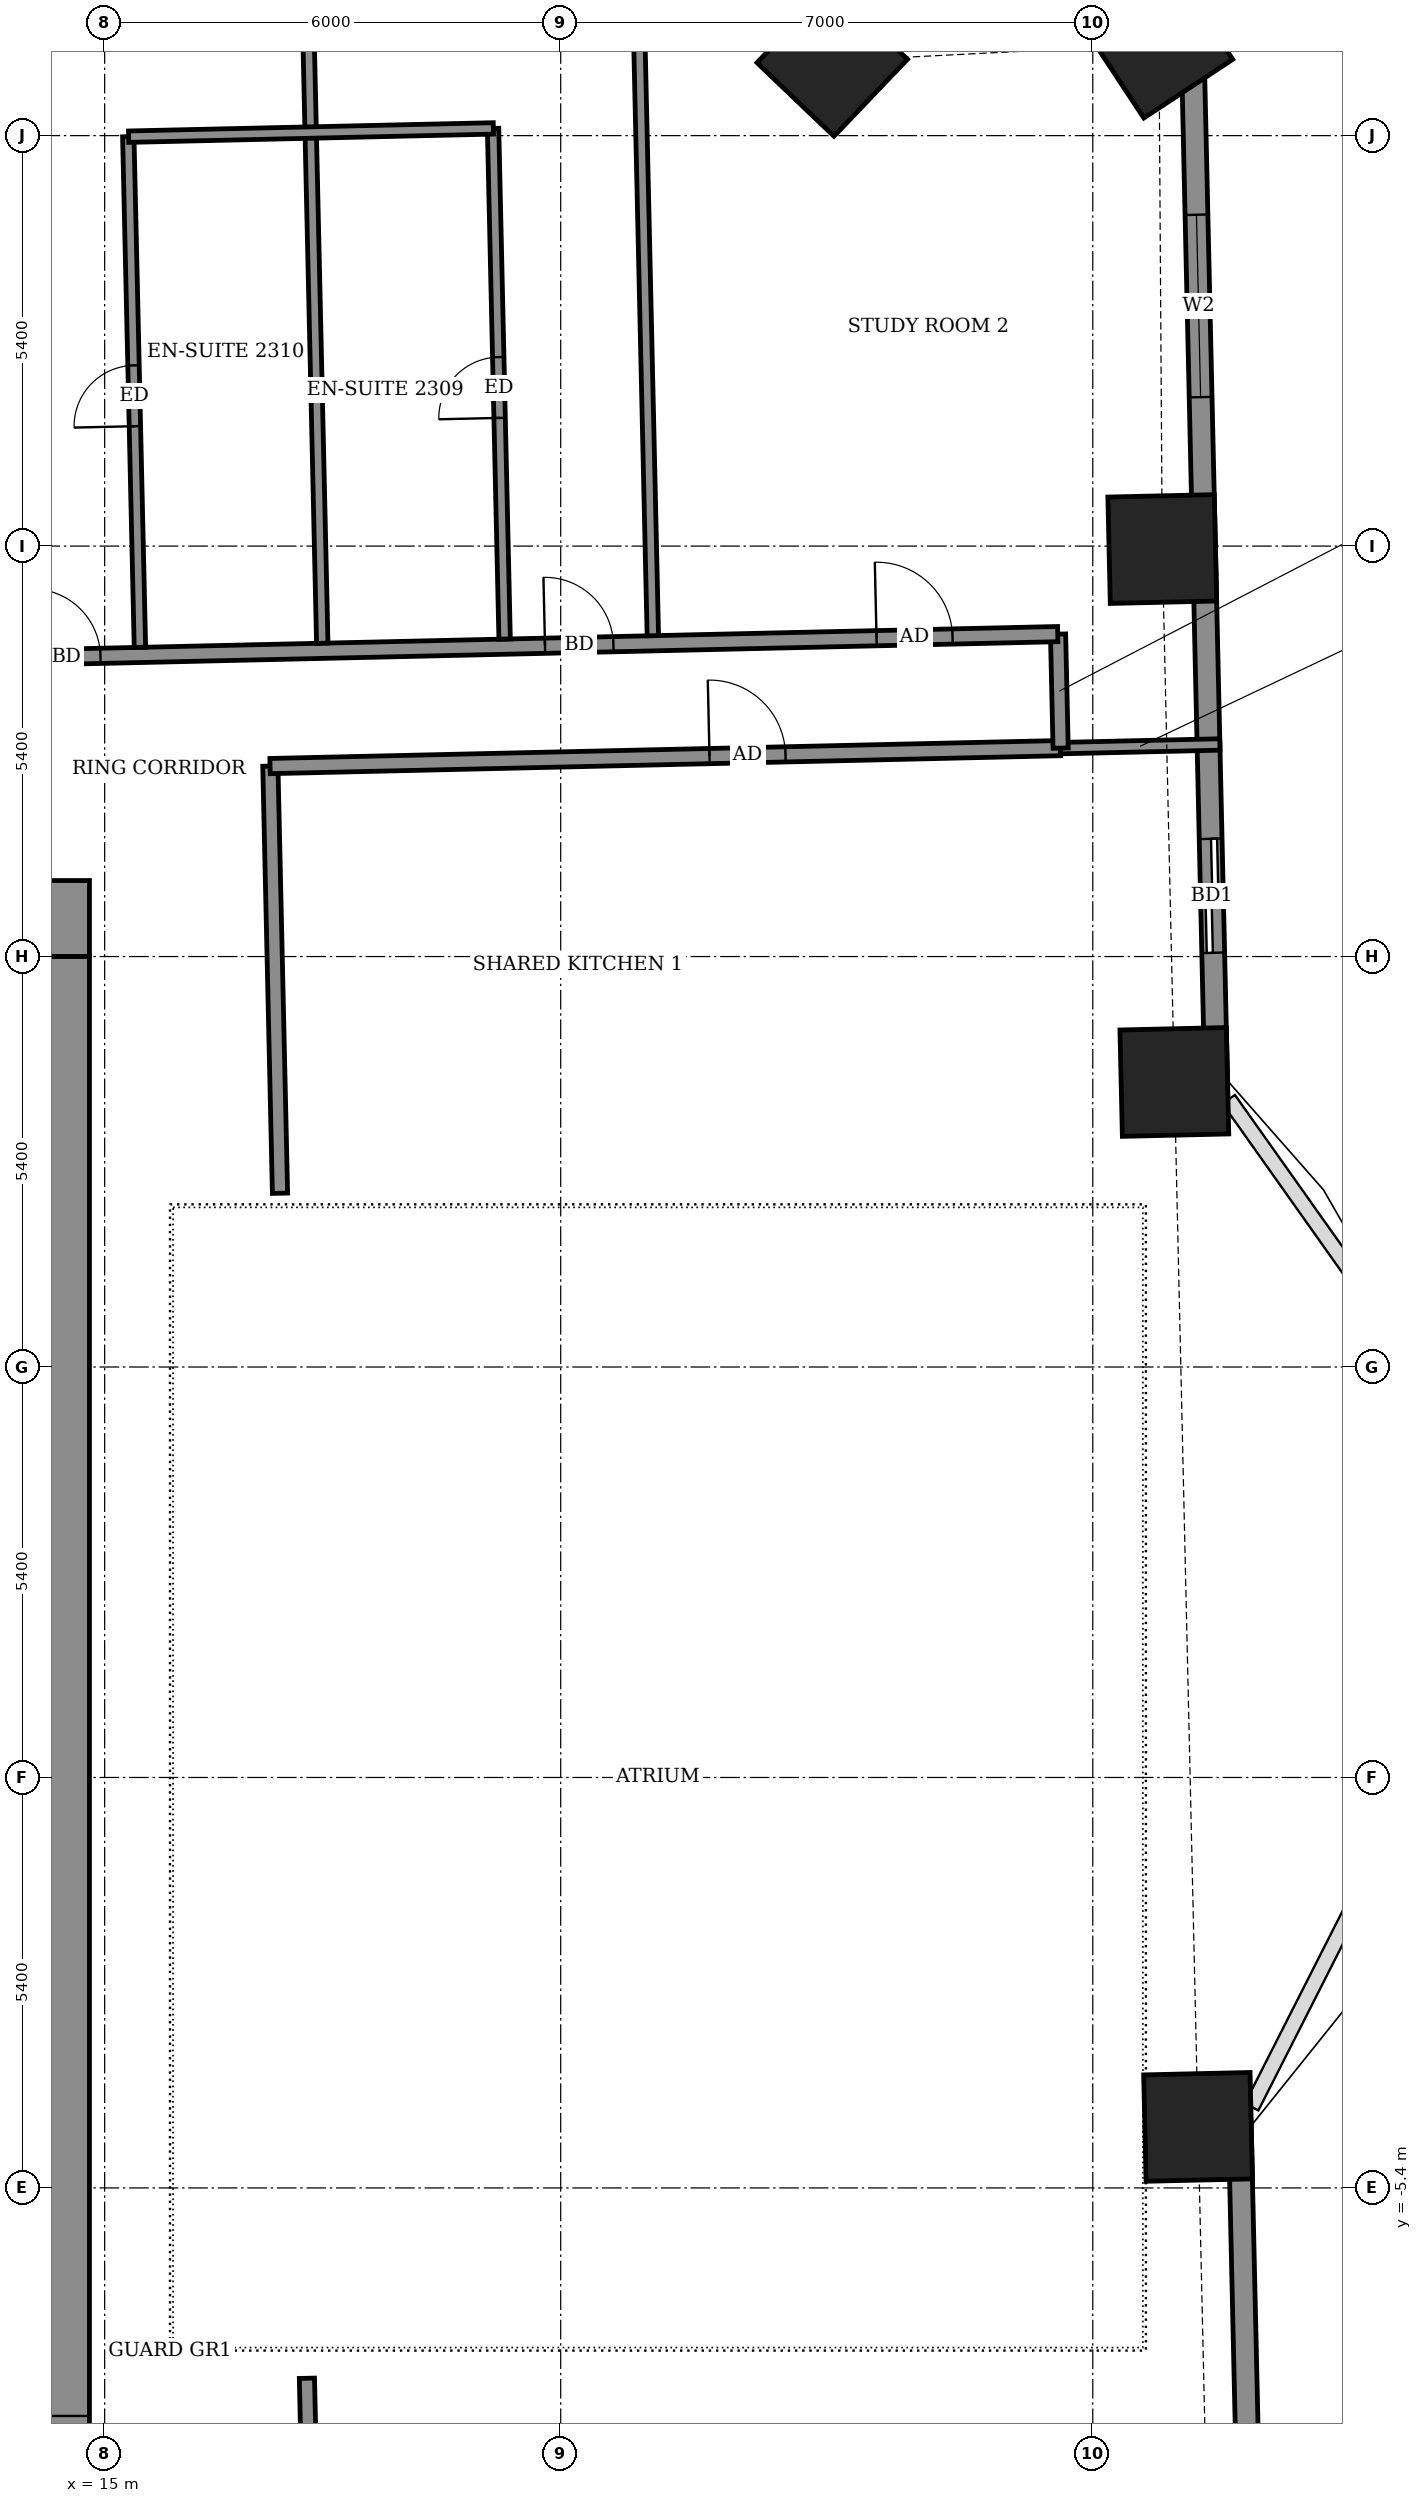
"""IFC4 building model, lengths in metres.
Left out: names, types, materials, properties, quantities, classifications, styles, units other than length and angle.
Written with IfcOpenShell. Run it as: python <this file> out.ifc"""

import sys

from ifc_helpers import new_model, si_unit, direction, frame, frame_2d, origin, origin_2d, place, context, subcontext, project, spatial, rectangle, extrude, element, fill, save


model = new_model("IFC4")
c1 = context("Model", 3, precision=1e-05, world=origin(), true_north=direction((0.0, 1.0)))
c2 = subcontext(c1, "Body", "Model", "MODEL_VIEW")
j1 = project(units=[si_unit("LENGTHUNIT", "METRE"), si_unit("PLANEANGLEUNIT", "RADIAN")], contexts=[c1])
p1 = place(None, origin())
s1 = spatial("IfcSite", under=j1, at=p1, CompositionType="ELEMENT")
p2 = place(p1, origin())
s2 = spatial("IfcBuilding", under=s1, at=p2, CompositionType="ELEMENT")
p3 = place(p2, frame((0.0, 0.0, 93.7)))
s3 = spatial("IfcBuildingStorey", under=s2, at=p3, CompositionType="ELEMENT", Elevation=93.7)
for number, where, z_axis, x_axis in (
    (1, (29.385, -4.597, -0.55), (0.0, 0.0, 1.0), (-0.023, 1.0, 0.0)),
    (2, (29.073, 9.15, -0.55), (0.0, 0.0, 1.0), (-0.023, 1.0, 0.0)),
    (3, (28.914, 16.161, -0.55), (0.0, 0.0, 1.0), (-0.023, 1.0, 0.0)),
    (4, (28.871, 22.802, -0.55), (0.0, 0.0, 1.0), (-0.551, 0.835, 0.0)),
    (5, (24.572, 22.582, -0.55), (0.0, 0.0, 1.0), (-0.723, 0.691, 0.0)),
):
    element("IfcColumn", number, at=place(p3, frame(where, z_axis=z_axis, x_axis=x_axis)), inside=s3, PredefinedType="COLUMN", context=c2, shape_type="SweptSolid", body=[
        extrude(rectangle(XDim=1.4, YDim=1.4, at=origin_2d()), origin(), (0.0, 0.0, 1.0), 3.6),
    ])
p4 = place(p3, frame((30.227, -17.455, 0.0), z_axis=(0.0, 0.0, 1.0), x_axis=(-0.022734702163, 0.999741533256, 0.0)))
e6 = element("IfcWall", 6, at=p4, inside=s3, PredefinedType="SOLIDWALL", context=c2, shape_type="SweptSolid", body=[
    extrude(rectangle(XDim=12.929, YDim=0.3, at=frame_2d((6.465, 0.0))), origin(), (0.0, 0.0, 1.0), 3.05),
])
p5 = place(p4, frame((2.566, 0.0, 0.0)))
e7 = element("IfcOpeningElement", 7, at=p5, cuts=e6, PredefinedType="OPENING", context=c2, shape_type="SweptSolid", body=[
    extrude(rectangle(XDim=1.5, YDim=2.4, at=frame_2d((0.75, 1.2))), frame((0.0, 0.16, 0.0), z_axis=(0.0, -1.0, 0.0), x_axis=(1.0, 0.0, 0.0)), (0.0, 0.0, 1.0), 0.32),
])
p6 = place(p4, frame((7.646, 0.0, 0.9)))
e8 = element("IfcOpeningElement", 8, at=p6, cuts=e6, PredefinedType="OPENING", context=c2, shape_type="SweptSolid", body=[
    extrude(rectangle(XDim=1.2, YDim=1.5, at=frame_2d((0.6, 0.75))), frame((0.0, 0.16, 0.0), z_axis=(0.0, -1.0, 0.0), x_axis=(1.0, 0.0, 0.0)), (0.0, 0.0, 1.0), 0.32),
])
p7 = place(p3, frame((29.624, 9.108, 0.0), z_axis=(0.0, 0.0, 1.0), x_axis=(-0.022679601751, 0.999742784752, 0.0)))
e9 = element("IfcWall", 9, at=p7, inside=s3, PredefinedType="SOLIDWALL", context=c2, shape_type="SweptSolid", body=[
    extrude(rectangle(XDim=13.93, YDim=0.3, at=frame_2d((6.965, 0.0))), origin(), (0.0, 0.0, 1.0), 3.05),
])
p8 = place(p7, frame((1.742, 0.0, 0.0)))
e10 = element("IfcOpeningElement", 10, at=p8, cuts=e9, PredefinedType="OPENING", context=c2, shape_type="SweptSolid", body=[
    extrude(rectangle(XDim=1.5, YDim=2.4, at=frame_2d((0.75, 1.2))), frame((0.0, 0.16, 0.0), z_axis=(0.0, -1.0, 0.0), x_axis=(1.0, 0.0, 0.0)), (0.0, 0.0, 1.0), 0.32),
])
p9 = place(p7, frame((9.054, 0.0, 0.9)))
e11 = element("IfcOpeningElement", 11, at=p9, cuts=e9, PredefinedType="OPENING", context=c2, shape_type="SweptSolid", body=[
    extrude(rectangle(XDim=2.4, YDim=1.5, at=frame_2d((1.2, 0.75))), frame((0.0, 0.16, 0.0), z_axis=(0.0, -1.0, 0.0), x_axis=(1.0, 0.0, 0.0)), (0.0, 0.0, 1.0), 0.32),
])
p10 = place(p3, frame((17.757, -12.137, 0.0), z_axis=(0.0, 0.0, 1.0), x_axis=(-0.022718785711, 0.999741895079, 0.0)))
e12 = element("IfcWall", 12, at=p10, inside=s3, PredefinedType="PARTITIONING", context=c2, shape_type="SweptSolid", body=[
    extrude(rectangle(XDim=4.234, YDim=0.2, at=frame_2d((2.117, 0.0))), origin(), (0.0, 0.0, 1.0), 3.05),
])
p11 = place(p3, frame((17.307, 7.686, 0.0), z_axis=(0.0, 0.0, 1.0), x_axis=(-0.022584272568, 0.999744942789, 0.0)))
e13 = element("IfcWall", 13, at=p11, inside=s3, PredefinedType="PARTITIONING", context=c2, shape_type="SweptSolid", body=[
    extrude(rectangle(XDim=5.621, YDim=0.2, at=frame_2d((2.811, 0.0))), origin(), (0.0, 0.0, 1.0), 3.05),
])
p12 = place(p3, frame((17.176, 13.306, 0.0), z_axis=(0.0, 0.0, 1.0), x_axis=(0.999742295888, 0.022701141223, 0.0)))
e14 = element("IfcWall", 14, at=p12, inside=s3, PredefinedType="PARTITIONING", context=c2, shape_type="SweptSolid", body=[
    extrude(rectangle(XDim=10.4, YDim=0.2, at=frame_2d((5.2, 0.0))), origin(), (0.0, 0.0, 1.0), 3.05),
])
p13 = place(p12, frame((5.783, 0.0, 0.0)))
e15 = element("IfcOpeningElement", 15, at=p13, cuts=e14, PredefinedType="OPENING", context=c2, shape_type="SweptSolid", body=[
    extrude(rectangle(XDim=1.0, YDim=2.1, at=frame_2d((0.5, 1.05))), frame((0.0, 0.11, 0.0), z_axis=(0.0, -1.0, 0.0), x_axis=(1.0, 0.0, 0.0)), (0.0, 0.0, 1.0), 0.22),
])
p14 = place(p3, frame((27.573, 13.542, 0.0), z_axis=(0.0, 0.0, 1.0), x_axis=(0.999737616439, 0.022906293375, 0.0)))
e16 = element("IfcWall", 16, at=p14, inside=s3, PredefinedType="PARTITIONING", context=c2, shape_type="SweptSolid", body=[
    extrude(rectangle(XDim=2.1, YDim=0.15, at=frame_2d((1.05, 0.0))), origin(), (0.0, 0.0, 1.0), 2.55),
])
p15 = place(p3, frame((27.577, 13.542, 0.0), z_axis=(0.0, 0.0, 1.0), x_axis=(-0.022617910375, 0.999744182344, 0.0)))
e17 = element("IfcWall", 17, at=p15, inside=s3, PredefinedType="PARTITIONING", context=c2, shape_type="SweptSolid", body=[
    extrude(rectangle(XDim=1.5, YDim=0.2, at=frame_2d((0.75, 0.0))), origin(), (0.0, 0.0, 1.0), 3.05),
])
p16 = place(p3, frame((-24.92, 13.851, 0.0), z_axis=(0.0, 0.0, 1.0), x_axis=(0.999742411711, 0.022696039895, 0.0)))
e18 = element("IfcWall", 18, at=p16, inside=s3, PredefinedType="PARTITIONING", context=c2, shape_type="SweptSolid", body=[
    extrude(rectangle(XDim=52.472, YDim=0.2, at=frame_2d((26.236, 0.0))), origin(), (0.0, 0.0, 1.0), 3.05),
])
p17 = place(p16, frame((50.088, 0.0, 0.0)))
e19 = element("IfcOpeningElement", 19, at=p17, cuts=e18, PredefinedType="OPENING", context=c2, shape_type="SweptSolid", body=[
    extrude(rectangle(XDim=1.0, YDim=2.1, at=frame_2d((0.5, 1.05))), frame((0.0, 0.11, 0.0), z_axis=(0.0, -1.0, 0.0), x_axis=(1.0, 0.0, 0.0)), (0.0, 0.0, 1.0), 0.22),
])
p18 = place(p16, frame((45.725, 0.0, 0.0)))
e20 = element("IfcOpeningElement", 20, at=p18, cuts=e18, PredefinedType="OPENING", context=c2, shape_type="SweptSolid", body=[
    extrude(rectangle(XDim=0.9, YDim=2.1, at=frame_2d((0.45, 1.05))), frame((0.0, 0.11, 0.0), z_axis=(0.0, -1.0, 0.0), x_axis=(1.0, 0.0, 0.0)), (0.0, 0.0, 1.0), 0.22),
])
p19 = place(p16, frame((38.975, 0.0, 0.0)))
e21 = element("IfcOpeningElement", 21, at=p19, cuts=e18, PredefinedType="OPENING", context=c2, shape_type="SweptSolid", body=[
    extrude(rectangle(XDim=0.9, YDim=2.1, at=frame_2d((0.45, 1.05))), frame((0.0, 0.11, 0.0), z_axis=(0.0, -1.0, 0.0), x_axis=(1.0, 0.0, 0.0)), (0.0, 0.0, 1.0), 0.22),
])
p20 = place(p16, frame((37.05, 0.0, 0.0)))
e22 = element("IfcOpeningElement", 22, at=p20, cuts=e18, PredefinedType="OPENING", context=c2, shape_type="SweptSolid", body=[
    extrude(rectangle(XDim=0.9, YDim=2.1, at=frame_2d((0.45, 1.05))), frame((0.0, 0.11, 0.0), z_axis=(0.0, -1.0, 0.0), x_axis=(1.0, 0.0, 0.0)), (0.0, 0.0, 1.0), 0.22),
])
p21 = place(p16, frame((30.35, 0.0, 0.0)))
e23 = element("IfcOpeningElement", 23, at=p21, cuts=e18, PredefinedType="OPENING", context=c2, shape_type="SweptSolid", body=[
    extrude(rectangle(XDim=0.9, YDim=2.1, at=frame_2d((0.45, 1.05))), frame((0.0, 0.11, 0.0), z_axis=(0.0, -1.0, 0.0), x_axis=(1.0, 0.0, 0.0)), (0.0, 0.0, 1.0), 0.22),
])
p22 = place(p16, frame((28.4, 0.0, 0.0)))
e24 = element("IfcOpeningElement", 24, at=p22, cuts=e18, PredefinedType="OPENING", context=c2, shape_type="SweptSolid", body=[
    extrude(rectangle(XDim=0.9, YDim=2.1, at=frame_2d((0.45, 1.05))), frame((0.0, 0.11, 0.0), z_axis=(0.0, -1.0, 0.0), x_axis=(1.0, 0.0, 0.0)), (0.0, 0.0, 1.0), 0.22),
])
p23 = place(p16, frame((21.675, 0.0, 0.0)))
e25 = element("IfcOpeningElement", 25, at=p23, cuts=e18, PredefinedType="OPENING", context=c2, shape_type="SweptSolid", body=[
    extrude(rectangle(XDim=0.9, YDim=2.1, at=frame_2d((0.45, 1.05))), frame((0.0, 0.11, 0.0), z_axis=(0.0, -1.0, 0.0), x_axis=(1.0, 0.0, 0.0)), (0.0, 0.0, 1.0), 0.22),
])
p24 = place(p16, frame((19.775, 0.0, 0.0)))
e26 = element("IfcOpeningElement", 26, at=p24, cuts=e18, PredefinedType="OPENING", context=c2, shape_type="SweptSolid", body=[
    extrude(rectangle(XDim=0.9, YDim=2.1, at=frame_2d((0.45, 1.05))), frame((0.0, 0.11, 0.0), z_axis=(0.0, -1.0, 0.0), x_axis=(1.0, 0.0, 0.0)), (0.0, 0.0, 1.0), 0.22),
])
p25 = place(p16, frame((13.0, 0.0, 0.0)))
e27 = element("IfcOpeningElement", 27, at=p25, cuts=e18, PredefinedType="OPENING", context=c2, shape_type="SweptSolid", body=[
    extrude(rectangle(XDim=0.9, YDim=2.1, at=frame_2d((0.45, 1.05))), frame((0.0, 0.11, 0.0), z_axis=(0.0, -1.0, 0.0), x_axis=(1.0, 0.0, 0.0)), (0.0, 0.0, 1.0), 0.22),
])
p26 = place(p16, frame((11.075, 0.0, 0.0)))
e28 = element("IfcOpeningElement", 28, at=p26, cuts=e18, PredefinedType="OPENING", context=c2, shape_type="SweptSolid", body=[
    extrude(rectangle(XDim=0.9, YDim=2.1, at=frame_2d((0.45, 1.05))), frame((0.0, 0.11, 0.0), z_axis=(0.0, -1.0, 0.0), x_axis=(1.0, 0.0, 0.0)), (0.0, 0.0, 1.0), 0.22),
])
p27 = place(p16, frame((3.049, 0.0, 0.0)))
e29 = element("IfcOpeningElement", 29, at=p27, cuts=e18, PredefinedType="OPENING", context=c2, shape_type="SweptSolid", body=[
    extrude(rectangle(XDim=1.0, YDim=2.1, at=frame_2d((0.5, 1.05))), frame((0.0, 0.11, 0.0), z_axis=(0.0, -1.0, 0.0), x_axis=(1.0, 0.0, 0.0)), (0.0, 0.0, 1.0), 0.22),
])
p28 = place(p3, frame((15.464, 14.868, 0.0), z_axis=(0.0, 0.0, 1.0), x_axis=(-0.022780001265, 0.999740502102, 0.0)))
e30 = element("IfcWall", 30, at=p28, inside=s3, PredefinedType="PARTITIONING", context=c2, shape_type="SweptSolid", body=[
    extrude(rectangle(XDim=6.72, YDim=0.15, at=frame_2d((3.36, 0.0))), origin(), (0.0, 0.0, 1.0), 3.05),
])
p29 = place(p28, frame((2.91, 0.0, 0.0)))
e31 = element("IfcOpeningElement", 31, at=p29, cuts=e30, PredefinedType="OPENING", context=c2, shape_type="SweptSolid", body=[
    extrude(rectangle(XDim=0.8, YDim=2.1, at=frame_2d((0.4, 1.05))), frame((0.0, 0.085, 0.0), z_axis=(0.0, -1.0, 0.0), x_axis=(1.0, 0.0, 0.0)), (0.0, 0.0, 1.0), 0.17),
])
p30 = place(p3, frame((17.863, 14.922, 0.0), z_axis=(0.0, 0.0, 1.0), x_axis=(-0.022661475803, 0.999743195783, 0.0)))
e32 = element("IfcWall", 32, at=p30, inside=s3, PredefinedType="PARTITIONING", context=c2, shape_type="SweptSolid", body=[
    extrude(rectangle(XDim=12.4, YDim=0.15, at=frame_2d((6.2, 0.0))), origin(), (0.0, 0.0, 1.0), 3.05),
])
p31 = place(p3, frame((20.262, 14.977, 0.0), z_axis=(0.0, 0.0, 1.0), x_axis=(-0.022598435707, 0.999744622743, 0.0)))
e33 = element("IfcWall", 33, at=p31, inside=s3, PredefinedType="PARTITIONING", context=c2, shape_type="SweptSolid", body=[
    extrude(rectangle(XDim=6.72, YDim=0.15, at=frame_2d((3.36, 0.0))), origin(), (0.0, 0.0, 1.0), 3.05),
])
p32 = place(p31, frame((2.91, 0.0, 0.0)))
e34 = element("IfcOpeningElement", 34, at=p32, cuts=e33, PredefinedType="OPENING", context=c2, shape_type="SweptSolid", body=[
    extrude(rectangle(XDim=0.8, YDim=2.1, at=frame_2d((0.4, 1.05))), frame((0.0, 0.085, 0.0), z_axis=(0.0, -1.0, 0.0), x_axis=(1.0, 0.0, 0.0)), (0.0, 0.0, 1.0), 0.17),
])
p33 = place(p3, frame((22.212, 15.021, 0.0), z_axis=(0.0, 0.0, 1.0), x_axis=(-0.022661475803, 0.999743195783, 0.0)))
e35 = element("IfcWall", 35, at=p33, inside=s3, PredefinedType="PARTITIONING", context=c2, shape_type="SweptSolid", body=[
    extrude(rectangle(XDim=12.4, YDim=0.15, at=frame_2d((6.2, 0.0))), origin(), (0.0, 0.0, 1.0), 2.55),
])
p34 = place(p3, frame((15.315, 21.586, 0.0), z_axis=(0.0, 0.0, 1.0), x_axis=(0.99974154664, 0.022734113616, 0.0)))
e36 = element("IfcWall", 36, at=p34, inside=s3, PredefinedType="PARTITIONING", context=c2, shape_type="SweptSolid", body=[
    extrude(rectangle(XDim=4.8, YDim=0.15, at=frame_2d((2.4, 0.0))), origin(), (0.0, 0.0, 1.0), 3.05),
])
p35 = place(p3, frame((-14.8, 11.3, 0.0), z_axis=(0.0, 0.0, 1.0), x_axis=(1.0, 0.0, 0.0)))
e37 = element("IfcWall", 37, at=p35, inside=s3, PredefinedType="SHEAR", context=c2, shape_type="SweptSolid", body=[
    extrude(rectangle(XDim=29.6, YDim=1.0, at=frame_2d((14.8, 0.0))), origin(), (0.0, 0.0, 1.0), 3.6),
])
p36 = place(p3, frame((14.3, -10.8, 0.0), z_axis=(0.0, 0.0, 1.0), x_axis=(0.0, 1.0, 0.0)))
e38 = element("IfcWall", 38, at=p36, inside=s3, PredefinedType="SHEAR", context=c2, shape_type="SweptSolid", body=[
    extrude(rectangle(XDim=21.6, YDim=1.0, at=frame_2d((10.8, 0.0))), origin(), (0.0, 0.0, 1.0), 3.6),
])
p37 = place(p36, frame((1.2, 0.0, 0.0)))
e39 = element("IfcOpeningElement", 39, at=p37, cuts=e38, PredefinedType="OPENING", context=c2, shape_type="SweptSolid", body=[
    extrude(rectangle(XDim=1.2, YDim=2.1, at=frame_2d((0.6, 1.05))), frame((0.0, 0.51, 0.0), z_axis=(0.0, -1.0, 0.0), x_axis=(1.0, 0.0, 0.0)), (0.0, 0.0, 1.0), 1.02),
])
p38 = place(p8, origin())
e40 = element("IfcDoor", 40, at=p38, inside=s3, OperationType="SLIDING_TO_LEFT", PredefinedType="DOOR", context=c2, shape_type="SweptSolid", body=[
    extrude(rectangle(XDim=1.5, YDim=2.4, at=frame_2d((0.75, 1.2))), frame((0.0, 0.025, 0.0), z_axis=(0.0, -1.0, 0.0), x_axis=(1.0, 0.0, 0.0)), (0.0, 0.0, 1.0), 0.05),
])
fill(e10, e40)
p39 = place(p9, origin())
e41 = element("IfcWindow", 41, at=p39, inside=s3, PartitioningType="DOUBLE_PANEL_VERTICAL", PredefinedType="WINDOW", context=c2, shape_type="SweptSolid", body=[
    extrude(rectangle(XDim=2.4, YDim=1.5, at=frame_2d((1.2, 0.75))), frame((0.0, 0.03, 0.0), z_axis=(0.0, -1.0, 0.0), x_axis=(1.0, 0.0, 0.0)), (0.0, 0.0, 1.0), 0.06),
])
fill(e11, e41)
p40 = place(p13, origin())
e42 = element("IfcDoor", 42, at=p40, inside=s3, OperationType="SINGLE_SWING_RIGHT", PredefinedType="DOOR", context=c2, shape_type="SweptSolid", body=[
    extrude(rectangle(XDim=1.0, YDim=2.1, at=frame_2d((0.5, 1.05))), frame((0.0, 0.025, 0.0), z_axis=(0.0, -1.0, 0.0), x_axis=(1.0, 0.0, 0.0)), (0.0, 0.0, 1.0), 0.05),
])
fill(e15, e42)
p41 = place(p17, origin())
e43 = element("IfcDoor", 43, at=p41, inside=s3, OperationType="SINGLE_SWING_LEFT", PredefinedType="DOOR", context=c2, shape_type="SweptSolid", body=[
    extrude(rectangle(XDim=1.0, YDim=2.1, at=frame_2d((0.5, 1.05))), frame((0.0, 0.025, 0.0), z_axis=(0.0, -1.0, 0.0), x_axis=(1.0, 0.0, 0.0)), (0.0, 0.0, 1.0), 0.05),
])
fill(e19, e43)
p42 = place(p18, origin())
e44 = element("IfcDoor", 44, at=p42, inside=s3, OperationType="SINGLE_SWING_LEFT", PredefinedType="DOOR", context=c2, shape_type="SweptSolid", body=[
    extrude(rectangle(XDim=0.9, YDim=2.1, at=frame_2d((0.45, 1.05))), frame((0.0, 0.025, 0.0), z_axis=(0.0, -1.0, 0.0), x_axis=(1.0, 0.0, 0.0)), (0.0, 0.0, 1.0), 0.05),
])
fill(e20, e44)
p43 = place(p32, origin())
e45 = element("IfcDoor", 45, at=p43, inside=s3, OperationType="SINGLE_SWING_LEFT", PredefinedType="DOOR", context=c2, shape_type="SweptSolid", body=[
    extrude(rectangle(XDim=0.8, YDim=2.1, at=frame_2d((0.4, 1.05))), frame((0.0, 0.025, 0.0), z_axis=(0.0, -1.0, 0.0), x_axis=(1.0, 0.0, 0.0)), (0.0, 0.0, 1.0), 0.05),
])
fill(e34, e45)
p44 = place(p19, origin())
e46 = element("IfcDoor", 46, at=p44, inside=s3, OperationType="SINGLE_SWING_RIGHT", PredefinedType="DOOR", context=c2, shape_type="SweptSolid", body=[
    extrude(rectangle(XDim=0.9, YDim=2.1, at=frame_2d((0.45, 1.05))), frame((0.0, 0.025, 0.0), z_axis=(0.0, -1.0, 0.0), x_axis=(1.0, 0.0, 0.0)), (0.0, 0.0, 1.0), 0.05),
])
fill(e21, e46)
p45 = place(p29, origin())
e47 = element("IfcDoor", 47, at=p45, inside=s3, OperationType="SINGLE_SWING_RIGHT", PredefinedType="DOOR", context=c2, shape_type="SweptSolid", body=[
    extrude(rectangle(XDim=0.8, YDim=2.1, at=frame_2d((0.4, 1.05))), frame((0.0, 0.025, 0.0), z_axis=(0.0, -1.0, 0.0), x_axis=(1.0, 0.0, 0.0)), (0.0, 0.0, 1.0), 0.05),
])
fill(e31, e47)
p46 = place(p37, origin())
e48 = element("IfcDoor", 48, at=p46, inside=s3, OperationType="DOUBLE_DOOR_SINGLE_SWING", PredefinedType="DOOR", context=c2, shape_type="SweptSolid", body=[
    extrude(rectangle(XDim=1.2, YDim=2.1, at=frame_2d((0.6, 1.05))), frame((0.0, 0.025, 0.0), z_axis=(0.0, -1.0, 0.0), x_axis=(1.0, 0.0, 0.0)), (0.0, 0.0, 1.0), 0.05),
])
fill(e39, e48)
save(model, sys.argv[1])
